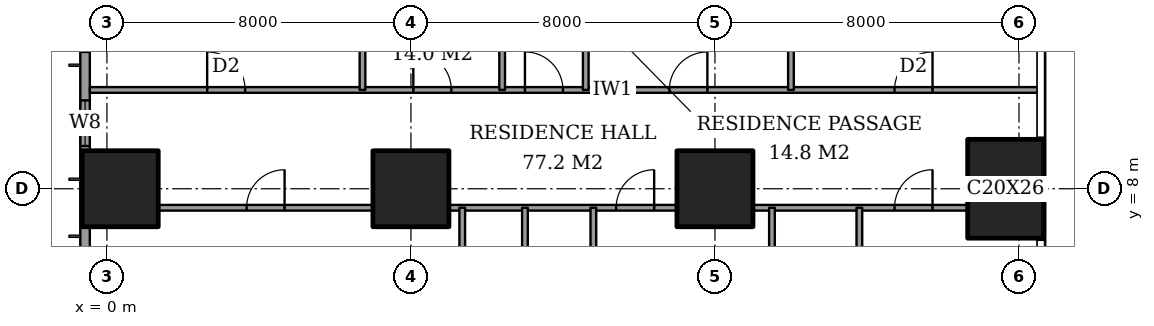
"""IFC4 building model, lengths in metres.
Left out: names, types, materials, properties, quantities, classifications, styles, units other than length and angle.
Written with IfcOpenShell. Run it as: python <this file> out.ifc"""

import sys

from ifc_helpers import new_model, si_unit, direction, frame, frame_2d, origin, origin_2d, place, context, subcontext, project, spatial, rectangle, extrude, element, fill, save


model = new_model("IFC4")
c1 = context("Model", 3, precision=1e-05, world=origin(), true_north=direction((0.0, 1.0)))
c2 = subcontext(c1, "Body", "Model", "MODEL_VIEW")
j1 = project(units=[si_unit("LENGTHUNIT", "METRE"), si_unit("PLANEANGLEUNIT", "RADIAN")], contexts=[c1])
p1 = place(None, origin())
s1 = spatial("IfcSite", under=j1, at=p1, CompositionType="ELEMENT")
p2 = place(p1, origin())
s2 = spatial("IfcBuilding", under=s1, at=p2, CompositionType="ELEMENT")
p3 = place(p2, frame((0.0, 0.0, 33.2)))
s3 = spatial("IfcBuildingStorey", under=s2, at=p3, CompositionType="ELEMENT", Elevation=33.2)
for number, where, z_axis, x_axis in (
    (1, (0.35, 8.0, 0.0), (0.0, 0.0, 1.0), (1.0, 0.0, 0.0)),
    (2, (8.0, 8.0, 0.0), (0.0, 0.0, 1.0), (1.0, 0.0, 0.0)),
    (3, (16.0, 8.0, 0.0), (0.0, 0.0, 1.0), (1.0, 0.0, 0.0)),
):
    element("IfcColumn", number, at=place(p3, frame(where, z_axis=z_axis, x_axis=x_axis)), inside=s3, PredefinedType="COLUMN", context=c2, shape_type="SweptSolid", body=[
        extrude(rectangle(XDim=2.0, YDim=2.0, at=origin_2d()), origin(), (0.0, 0.0, 1.0), 3.6),
    ])
p4 = place(p3, frame((23.65, 8.0, 0.0), z_axis=(0.0, 0.0, 1.0), x_axis=(1.0, 0.0, 0.0)))
e4 = element("IfcColumn", 4, at=p4, inside=s3, PredefinedType="COLUMN", context=c2, shape_type="SweptSolid", body=[
    extrude(rectangle(XDim=2.0, YDim=2.6, at=origin_2d()), origin(), (0.0, 0.0, 1.0), 3.6),
])
p5 = place(p3, frame((-0.575, 44.825, 0.0), z_axis=(0.0, 0.0, 1.0), x_axis=(0.0, -1.0, 0.0)))
e5 = element("IfcWall", 5, at=p5, inside=s3, PredefinedType="SOLIDWALL", context=c2, shape_type="SweptSolid", body=[
    extrude(rectangle(XDim=41.65, YDim=0.25, at=frame_2d((20.825, 0.0))), origin(), (0.0, 0.0, 1.0), 3.6),
])
p6 = place(p5, frame((0.775, 0.0, 0.6)))
e6 = element("IfcOpeningElement", 6, at=p6, cuts=e5, PredefinedType="OPENING", context=c2, shape_type="SweptSolid", body=[
    extrude(rectangle(XDim=2.4, YDim=2.0, at=frame_2d((1.2, 1.0))), frame((0.0, 0.135, 0.0), z_axis=(0.0, -1.0, 0.0), x_axis=(1.0, 0.0, 0.0)), (0.0, 0.0, 1.0), 0.27),
])
p7 = place(p5, frame((6.225, 0.0, 0.6)))
e7 = element("IfcOpeningElement", 7, at=p7, cuts=e5, PredefinedType="OPENING", context=c2, shape_type="SweptSolid", body=[
    extrude(rectangle(XDim=1.2, YDim=2.0, at=frame_2d((0.6, 1.0))), frame((0.0, 0.135, 0.0), z_axis=(0.0, -1.0, 0.0), x_axis=(1.0, 0.0, 0.0)), (0.0, 0.0, 1.0), 0.27),
])
p8 = place(p5, frame((8.625, 0.0, 0.6)))
e8 = element("IfcOpeningElement", 8, at=p8, cuts=e5, PredefinedType="OPENING", context=c2, shape_type="SweptSolid", body=[
    extrude(rectangle(XDim=2.4, YDim=2.0, at=frame_2d((1.2, 1.0))), frame((0.0, 0.135, 0.0), z_axis=(0.0, -1.0, 0.0), x_axis=(1.0, 0.0, 0.0)), (0.0, 0.0, 1.0), 0.27),
])
p9 = place(p5, frame((15.625, 0.0, 0.6)))
e9 = element("IfcOpeningElement", 9, at=p9, cuts=e5, PredefinedType="OPENING", context=c2, shape_type="SweptSolid", body=[
    extrude(rectangle(XDim=2.4, YDim=2.0, at=frame_2d((1.2, 1.0))), frame((0.0, 0.135, 0.0), z_axis=(0.0, -1.0, 0.0), x_axis=(1.0, 0.0, 0.0)), (0.0, 0.0, 1.0), 0.27),
])
p10 = place(p5, frame((23.625, 0.0, 0.6)))
e10 = element("IfcOpeningElement", 10, at=p10, cuts=e5, PredefinedType="OPENING", context=c2, shape_type="SweptSolid", body=[
    extrude(rectangle(XDim=2.4, YDim=2.0, at=frame_2d((1.2, 1.0))), frame((0.0, 0.135, 0.0), z_axis=(0.0, -1.0, 0.0), x_axis=(1.0, 0.0, 0.0)), (0.0, 0.0, 1.0), 0.27),
])
p11 = place(p5, frame((30.825, 0.0, 0.6)))
e11 = element("IfcOpeningElement", 11, at=p11, cuts=e5, PredefinedType="OPENING", context=c2, shape_type="SweptSolid", body=[
    extrude(rectangle(XDim=2.4, YDim=2.0, at=frame_2d((1.2, 1.0))), frame((0.0, 0.135, 0.0), z_axis=(0.0, -1.0, 0.0), x_axis=(1.0, 0.0, 0.0)), (0.0, 0.0, 1.0), 0.27),
])
p12 = place(p5, frame((34.5, 0.0, 0.6)))
e12 = element("IfcOpeningElement", 12, at=p12, cuts=e5, PredefinedType="OPENING", context=c2, shape_type="SweptSolid", body=[
    extrude(rectangle(XDim=1.2, YDim=2.0, at=frame_2d((0.6, 1.0))), frame((0.0, 0.135, 0.0), z_axis=(0.0, -1.0, 0.0), x_axis=(1.0, 0.0, 0.0)), (0.0, 0.0, 1.0), 0.27),
])
p13 = place(p5, frame((38.475, 0.0, 0.6)))
e13 = element("IfcOpeningElement", 13, at=p13, cuts=e5, PredefinedType="OPENING", context=c2, shape_type="SweptSolid", body=[
    extrude(rectangle(XDim=2.4, YDim=2.0, at=frame_2d((1.2, 1.0))), frame((0.0, 0.135, 0.0), z_axis=(0.0, -1.0, 0.0), x_axis=(1.0, 0.0, 0.0)), (0.0, 0.0, 1.0), 0.27),
])
p14 = place(p3, frame((1.35, 7.5, 0.0), z_axis=(0.0, 0.0, 1.0), x_axis=(1.0, 0.0, 0.0)))
e14 = element("IfcWall", 14, at=p14, inside=s3, PredefinedType="PARTITIONING", context=c2, shape_type="SweptSolid", body=[
    extrude(rectangle(XDim=5.65, YDim=0.15, at=frame_2d((2.825, 0.0))), origin(), (0.0, 0.0, 1.0), 3.35),
])
p15 = place(p14, frame((2.325, 0.0, 0.0)))
e15 = element("IfcOpeningElement", 15, at=p15, cuts=e14, PredefinedType="OPENING", context=c2, shape_type="SweptSolid", body=[
    extrude(rectangle(XDim=1.0, YDim=2.1, at=frame_2d((0.5, 1.05))), frame((0.0, 0.085, 0.0), z_axis=(0.0, -1.0, 0.0), x_axis=(1.0, 0.0, 0.0)), (0.0, 0.0, 1.0), 0.17),
])
p16 = place(p3, frame((9.0, 7.5, 0.0), z_axis=(0.0, 0.0, 1.0), x_axis=(1.0, 0.0, 0.0)))
e16 = element("IfcWall", 16, at=p16, inside=s3, PredefinedType="PARTITIONING", context=c2, shape_type="SweptSolid", body=[
    extrude(rectangle(XDim=6.0, YDim=0.15, at=frame_2d((3.0, 0.0))), origin(), (0.0, 0.0, 1.0), 3.35),
])
p17 = place(p16, frame((4.4, 0.0, 0.0)))
e17 = element("IfcOpeningElement", 17, at=p17, cuts=e16, PredefinedType="OPENING", context=c2, shape_type="SweptSolid", body=[
    extrude(rectangle(XDim=1.0, YDim=2.1, at=frame_2d((0.5, 1.05))), frame((0.0, 0.085, 0.0), z_axis=(0.0, -1.0, 0.0), x_axis=(1.0, 0.0, 0.0)), (0.0, 0.0, 1.0), 0.17),
])
p18 = place(p3, frame((17.0, 7.5, 0.0), z_axis=(0.0, 0.0, 1.0), x_axis=(1.0, 0.0, 0.0)))
e18 = element("IfcWall", 18, at=p18, inside=s3, PredefinedType="PARTITIONING", context=c2, shape_type="SweptSolid", body=[
    extrude(rectangle(XDim=5.65, YDim=0.15, at=frame_2d((2.825, 0.0))), origin(), (0.0, 0.0, 1.0), 3.35),
])
p19 = place(p18, frame((3.725, 0.0, 0.0)))
e19 = element("IfcOpeningElement", 19, at=p19, cuts=e18, PredefinedType="OPENING", context=c2, shape_type="SweptSolid", body=[
    extrude(rectangle(XDim=1.0, YDim=2.1, at=frame_2d((0.5, 1.05))), frame((0.0, 0.085, 0.0), z_axis=(0.0, -1.0, 0.0), x_axis=(1.0, 0.0, 0.0)), (0.0, 0.0, 1.0), 0.17),
])
p20 = place(p3, frame((-0.45, 10.6, 0.0), z_axis=(0.0, 0.0, 1.0), x_axis=(1.0, 0.0, 0.0)))
e20 = element("IfcWall", 20, at=p20, inside=s3, PredefinedType="PARTITIONING", context=c2, shape_type="SweptSolid", body=[
    extrude(rectangle(XDim=25.011, YDim=0.15, at=frame_2d((12.505, 0.0))), origin(), (0.0, 0.0, 1.0), 3.35),
])
p21 = place(p20, frame((11.45, 0.0, 0.0)))
e21 = element("IfcOpeningElement", 21, at=p21, cuts=e20, PredefinedType="OPENING", context=c2, shape_type="SweptSolid", body=[
    extrude(rectangle(XDim=1.0, YDim=2.1, at=frame_2d((0.5, 1.05))), frame((0.0, 0.085, 0.0), z_axis=(0.0, -1.0, 0.0), x_axis=(1.0, 0.0, 0.0)), (0.0, 0.0, 1.0), 0.17),
])
p22 = place(p20, frame((3.087, 0.0, 0.0)))
e22 = element("IfcOpeningElement", 22, at=p22, cuts=e20, PredefinedType="OPENING", context=c2, shape_type="SweptSolid", body=[
    extrude(rectangle(XDim=1.0, YDim=2.1, at=frame_2d((0.5, 1.05))), frame((0.0, 0.085, 0.0), z_axis=(0.0, -1.0, 0.0), x_axis=(1.0, 0.0, 0.0)), (0.0, 0.0, 1.0), 0.17),
])
p23 = place(p20, frame((8.512, 0.0, 0.0)))
e23 = element("IfcOpeningElement", 23, at=p23, cuts=e20, PredefinedType="OPENING", context=c2, shape_type="SweptSolid", body=[
    extrude(rectangle(XDim=1.0, YDim=2.1, at=frame_2d((0.5, 1.05))), frame((0.0, 0.085, 0.0), z_axis=(0.0, -1.0, 0.0), x_axis=(1.0, 0.0, 0.0)), (0.0, 0.0, 1.0), 0.17),
])
p24 = place(p20, frame((15.25, 0.0, 0.0)))
e24 = element("IfcOpeningElement", 24, at=p24, cuts=e20, PredefinedType="OPENING", context=c2, shape_type="SweptSolid", body=[
    extrude(rectangle(XDim=1.0, YDim=2.1, at=frame_2d((0.5, 1.05))), frame((0.0, 0.085, 0.0), z_axis=(0.0, -1.0, 0.0), x_axis=(1.0, 0.0, 0.0)), (0.0, 0.0, 1.0), 0.17),
])
p25 = place(p20, frame((21.175, 0.0, 0.0)))
e25 = element("IfcOpeningElement", 25, at=p25, cuts=e20, PredefinedType="OPENING", context=c2, shape_type="SweptSolid", body=[
    extrude(rectangle(XDim=1.0, YDim=2.1, at=frame_2d((0.5, 1.05))), frame((0.0, 0.085, 0.0), z_axis=(0.0, -1.0, 0.0), x_axis=(1.0, 0.0, 0.0)), (0.0, 0.0, 1.0), 0.17),
])
p26 = place(p3, frame((6.725, 10.6, 0.0), z_axis=(0.0, 0.0, 1.0), x_axis=(0.0, 1.0, 0.0)))
e26 = element("IfcWall", 26, at=p26, inside=s3, PredefinedType="PARTITIONING", context=c2, shape_type="SweptSolid", body=[
    extrude(rectangle(XDim=4.2, YDim=0.15, at=frame_2d((2.1, 0.0))), origin(), (0.0, 0.0, 1.0), 3.35),
])
p27 = place(p3, frame((9.35, -0.45, 0.0), z_axis=(0.0, 0.0, 1.0), x_axis=(0.0, 1.0, 0.0)))
e27 = element("IfcWall", 27, at=p27, inside=s3, PredefinedType="PARTITIONING", context=c2, shape_type="SweptSolid", body=[
    extrude(rectangle(XDim=7.95, YDim=0.15, at=frame_2d((3.975, 0.0))), origin(), (0.0, 0.0, 1.0), 3.35),
])
p28 = place(p27, frame((3.525, 0.0, 0.0)))
e28 = element("IfcOpeningElement", 28, at=p28, cuts=e27, PredefinedType="OPENING", context=c2, shape_type="SweptSolid", body=[
    extrude(rectangle(XDim=0.9, YDim=2.1, at=frame_2d((0.45, 1.05))), frame((0.0, 0.085, 0.0), z_axis=(0.0, -1.0, 0.0), x_axis=(1.0, 0.0, 0.0)), (0.0, 0.0, 1.0), 0.17),
])
p29 = place(p3, frame((10.4, 10.6, 0.0), z_axis=(0.0, 0.0, 1.0), x_axis=(0.0, 1.0, 0.0)))
e29 = element("IfcWall", 29, at=p29, inside=s3, PredefinedType="PARTITIONING", context=c2, shape_type="SweptSolid", body=[
    extrude(rectangle(XDim=11.0, YDim=0.15, at=frame_2d((5.5, 0.0))), origin(), (0.0, 0.0, 1.0), 3.35),
])
p30 = place(p29, frame((8.363, 0.0, 0.0)))
e30 = element("IfcOpeningElement", 30, at=p30, cuts=e29, PredefinedType="OPENING", context=c2, shape_type="SweptSolid", body=[
    extrude(rectangle(XDim=1.0, YDim=2.1, at=frame_2d((0.5, 1.05))), frame((0.0, 0.085, 0.0), z_axis=(0.0, -1.0, 0.0), x_axis=(1.0, 0.0, 0.0)), (0.0, 0.0, 1.0), 0.17),
])
p31 = place(p3, frame((11.0, -0.45, 0.0), z_axis=(0.0, 0.0, 1.0), x_axis=(0.0, 1.0, 0.0)))
e31 = element("IfcWall", 31, at=p31, inside=s3, PredefinedType="PARTITIONING", context=c2, shape_type="SweptSolid", body=[
    extrude(rectangle(XDim=7.95, YDim=0.15, at=frame_2d((3.975, 0.0))), origin(), (0.0, 0.0, 1.0), 3.35),
])
p32 = place(p3, frame((12.6, 10.6, 0.0), z_axis=(0.0, 0.0, 1.0), x_axis=(0.0, 1.0, 0.0)))
e32 = element("IfcWall", 32, at=p32, inside=s3, PredefinedType="PARTITIONING", context=c2, shape_type="SweptSolid", body=[
    extrude(rectangle(XDim=6.725, YDim=0.15, at=frame_2d((3.362, 0.0))), origin(), (0.0, 0.0, 1.0), 3.35),
])
p33 = place(p3, frame((12.8, -0.45, 0.0), z_axis=(0.0, 0.0, 1.0), x_axis=(0.0, 1.0, 0.0)))
e33 = element("IfcWall", 33, at=p33, inside=s3, PredefinedType="PARTITIONING", context=c2, shape_type="SweptSolid", body=[
    extrude(rectangle(XDim=7.95, YDim=0.15, at=frame_2d((3.975, 0.0))), origin(), (0.0, 0.0, 1.0), 3.35),
])
p34 = place(p33, frame((3.525, 0.0, 0.0)))
e34 = element("IfcOpeningElement", 34, at=p34, cuts=e33, PredefinedType="OPENING", context=c2, shape_type="SweptSolid", body=[
    extrude(rectangle(XDim=0.9, YDim=2.1, at=frame_2d((0.45, 1.05))), frame((0.0, 0.085, 0.0), z_axis=(0.0, -1.0, 0.0), x_axis=(1.0, 0.0, 0.0)), (0.0, 0.0, 1.0), 0.17),
])
p35 = place(p3, frame((17.5, -0.45, 0.0), z_axis=(0.0, 0.0, 1.0), x_axis=(0.0, 1.0, 0.0)))
e35 = element("IfcWall", 35, at=p35, inside=s3, PredefinedType="PARTITIONING", context=c2, shape_type="SweptSolid", body=[
    extrude(rectangle(XDim=7.95, YDim=0.15, at=frame_2d((3.975, 0.0))), origin(), (0.0, 0.0, 1.0), 3.35),
])
p36 = place(p3, frame((18.0, 10.6, 0.0), z_axis=(0.0, 0.0, 1.0), x_axis=(0.0, 1.0, 0.0)))
e36 = element("IfcWall", 36, at=p36, inside=s3, PredefinedType="PARTITIONING", context=c2, shape_type="SweptSolid", body=[
    extrude(rectangle(XDim=6.725, YDim=0.15, at=frame_2d((3.362, 0.0))), origin(), (0.0, 0.0, 1.0), 3.35),
])
p37 = place(p3, frame((19.8, -0.45, 0.0), z_axis=(0.0, 0.0, 1.0), x_axis=(0.0, 1.0, 0.0)))
e37 = element("IfcWall", 37, at=p37, inside=s3, PredefinedType="PARTITIONING", context=c2, shape_type="SweptSolid", body=[
    extrude(rectangle(XDim=7.95, YDim=0.15, at=frame_2d((3.975, 0.0))), origin(), (0.0, 0.0, 1.0), 3.35),
])
p38 = place(p37, frame((3.525, 0.0, 0.0)))
e38 = element("IfcOpeningElement", 38, at=p38, cuts=e37, PredefinedType="OPENING", context=c2, shape_type="SweptSolid", body=[
    extrude(rectangle(XDim=0.9, YDim=2.1, at=frame_2d((0.45, 1.05))), frame((0.0, 0.085, 0.0), z_axis=(0.0, -1.0, 0.0), x_axis=(1.0, 0.0, 0.0)), (0.0, 0.0, 1.0), 0.17),
])
p39 = place(p12, origin())
e39 = element("IfcWindow", 39, at=p39, inside=s3, PartitioningType="SINGLE_PANEL", PredefinedType="WINDOW", context=c2, shape_type="SweptSolid", body=[
    extrude(rectangle(XDim=1.2, YDim=2.0, at=frame_2d((0.6, 1.0))), frame((0.0, 0.03, 0.0), z_axis=(0.0, -1.0, 0.0), x_axis=(1.0, 0.0, 0.0)), (0.0, 0.0, 1.0), 0.06),
])
fill(e12, e39)
p40 = place(p15, origin())
e40 = element("IfcDoor", 40, at=p40, inside=s3, OperationType="SINGLE_SWING_LEFT", PredefinedType="DOOR", context=c2, shape_type="SweptSolid", body=[
    extrude(rectangle(XDim=1.0, YDim=2.1, at=frame_2d((0.5, 1.05))), frame((0.0, 0.025, 0.0), z_axis=(0.0, -1.0, 0.0), x_axis=(1.0, 0.0, 0.0)), (0.0, 0.0, 1.0), 0.05),
])
fill(e15, e40)
p41 = place(p17, origin())
e41 = element("IfcDoor", 41, at=p41, inside=s3, OperationType="SINGLE_SWING_LEFT", PredefinedType="DOOR", context=c2, shape_type="SweptSolid", body=[
    extrude(rectangle(XDim=1.0, YDim=2.1, at=frame_2d((0.5, 1.05))), frame((0.0, 0.025, 0.0), z_axis=(0.0, -1.0, 0.0), x_axis=(1.0, 0.0, 0.0)), (0.0, 0.0, 1.0), 0.05),
])
fill(e17, e41)
p42 = place(p19, origin())
e42 = element("IfcDoor", 42, at=p42, inside=s3, OperationType="SINGLE_SWING_LEFT", PredefinedType="DOOR", context=c2, shape_type="SweptSolid", body=[
    extrude(rectangle(XDim=1.0, YDim=2.1, at=frame_2d((0.5, 1.05))), frame((0.0, 0.025, 0.0), z_axis=(0.0, -1.0, 0.0), x_axis=(1.0, 0.0, 0.0)), (0.0, 0.0, 1.0), 0.05),
])
fill(e19, e42)
p43 = place(p21, origin())
e43 = element("IfcDoor", 43, at=p43, inside=s3, OperationType="SINGLE_SWING_RIGHT", PredefinedType="DOOR", context=c2, shape_type="SweptSolid", body=[
    extrude(rectangle(XDim=1.0, YDim=2.1, at=frame_2d((0.5, 1.05))), frame((0.0, 0.025, 0.0), z_axis=(0.0, -1.0, 0.0), x_axis=(1.0, 0.0, 0.0)), (0.0, 0.0, 1.0), 0.05),
])
fill(e21, e43)
p44 = place(p22, origin())
e44 = element("IfcDoor", 44, at=p44, inside=s3, OperationType="SINGLE_SWING_RIGHT", PredefinedType="DOOR", context=c2, shape_type="SweptSolid", body=[
    extrude(rectangle(XDim=1.0, YDim=2.1, at=frame_2d((0.5, 1.05))), frame((0.0, 0.025, 0.0), z_axis=(0.0, -1.0, 0.0), x_axis=(1.0, 0.0, 0.0)), (0.0, 0.0, 1.0), 0.05),
])
fill(e22, e44)
p45 = place(p23, origin())
e45 = element("IfcDoor", 45, at=p45, inside=s3, OperationType="SINGLE_SWING_RIGHT", PredefinedType="DOOR", context=c2, shape_type="SweptSolid", body=[
    extrude(rectangle(XDim=1.0, YDim=2.1, at=frame_2d((0.5, 1.05))), frame((0.0, 0.025, 0.0), z_axis=(0.0, -1.0, 0.0), x_axis=(1.0, 0.0, 0.0)), (0.0, 0.0, 1.0), 0.05),
])
fill(e23, e45)
p46 = place(p24, origin())
e46 = element("IfcDoor", 46, at=p46, inside=s3, OperationType="SINGLE_SWING_LEFT", PredefinedType="DOOR", context=c2, shape_type="SweptSolid", body=[
    extrude(rectangle(XDim=1.0, YDim=2.1, at=frame_2d((0.5, 1.05))), frame((0.0, 0.025, 0.0), z_axis=(0.0, -1.0, 0.0), x_axis=(1.0, 0.0, 0.0)), (0.0, 0.0, 1.0), 0.05),
])
fill(e24, e46)
p47 = place(p25, origin())
e47 = element("IfcDoor", 47, at=p47, inside=s3, OperationType="SINGLE_SWING_LEFT", PredefinedType="DOOR", context=c2, shape_type="SweptSolid", body=[
    extrude(rectangle(XDim=1.0, YDim=2.1, at=frame_2d((0.5, 1.05))), frame((0.0, 0.025, 0.0), z_axis=(0.0, -1.0, 0.0), x_axis=(1.0, 0.0, 0.0)), (0.0, 0.0, 1.0), 0.05),
])
fill(e25, e47)
save(model, sys.argv[1])
